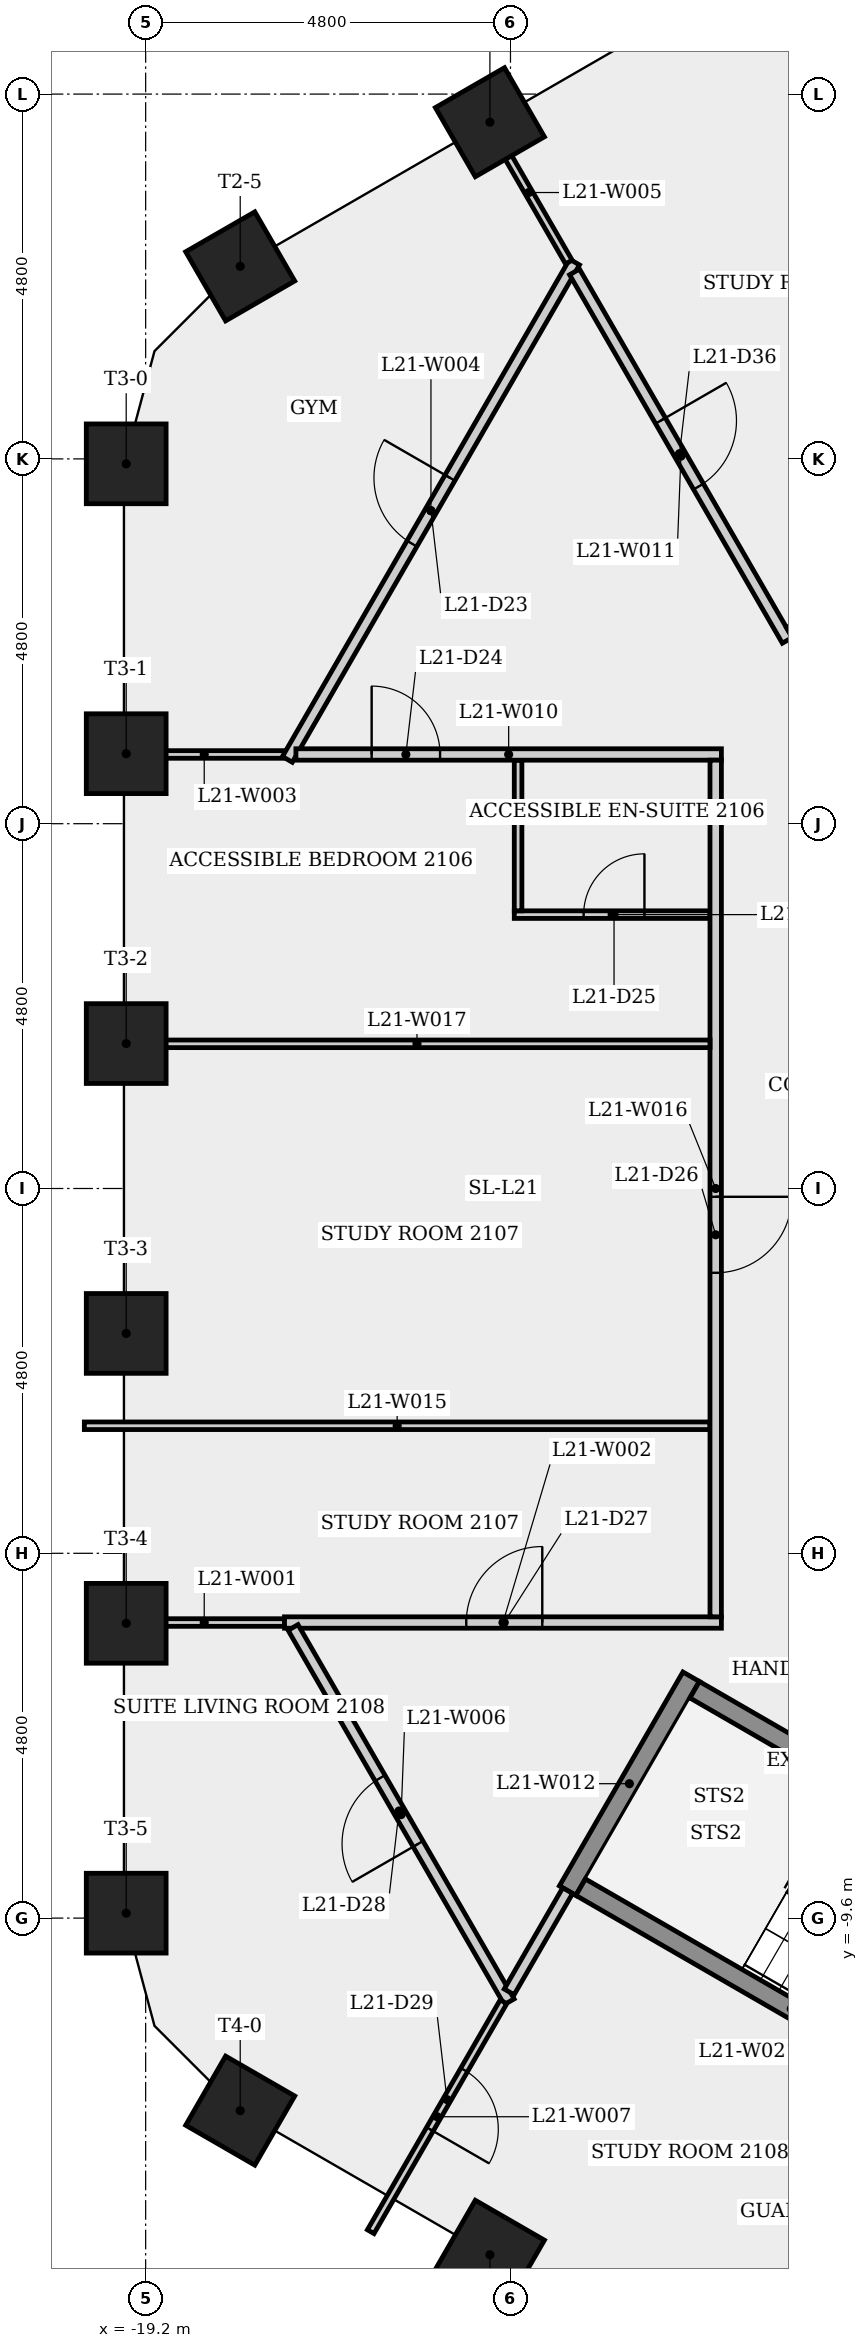
"""IFC4 building model, lengths in metres.
Left out: names, types, materials, properties, quantities, classifications, styles, units other than length and angle.
Written with IfcOpenShell. Run it as: python <this file> out.ifc"""

import sys

from ifc_helpers import new_model, si_unit, direction, frame, frame_2d, origin, origin_2d, place, context, subcontext, project, spatial, rectangle, extrude, element, fill, save


model = new_model("IFC4")
c1 = context("Model", 3, precision=1e-05, world=origin(), true_north=direction((0.0, 1.0)))
c2 = subcontext(c1, "Body", "Model", "MODEL_VIEW")
j1 = project(units=[si_unit("LENGTHUNIT", "METRE"), si_unit("PLANEANGLEUNIT", "RADIAN")], contexts=[c1])
p1 = place(None, origin())
s1 = spatial("IfcSite", under=j1, at=p1, CompositionType="ELEMENT")
p2 = place(p1, origin())
s2 = spatial("IfcBuilding", under=s1, at=p2, CompositionType="ELEMENT")
p3 = place(p2, frame((0.0, 0.0, 83.1)))
s3 = spatial("IfcBuildingStorey", under=s2, at=p3, CompositionType="ELEMENT", Elevation=83.1)
for number, where, z_axis, x_axis in (
    (1, (-14.671, 14.03, 0.0), (0.0, 0.0, 1.0), (-0.5, 0.866, 0.0)),
    (2, (-17.956, 12.133, 0.0), (0.0, 0.0, 1.0), (-0.5, 0.866, 0.0)),
    (3, (-19.456, 9.535, 0.0), (0.0, 0.0, 1.0), (-1.0, 0.0, 0.0)),
    (4, (-19.456, 5.721, 0.0), (0.0, 0.0, 1.0), (-1.0, 0.0, 0.0)),
    (5, (-19.456, 1.907, 0.0), (0.0, 0.0, 1.0), (-1.0, 0.0, 0.0)),
    (6, (-19.456, -1.907, 0.0), (0.0, 0.0, 1.0), (-1.0, 0.0, 0.0)),
    (7, (-19.456, -5.721, 0.0), (0.0, 0.0, 1.0), (-1.0, 0.0, 0.0)),
    (8, (-19.456, -9.535, 0.0), (0.0, 0.0, 1.0), (-1.0, 0.0, 0.0)),
    (9, (-17.956, -12.133, 0.0), (0.0, 0.0, 1.0), (-0.5, -0.866, 0.0)),
    (10, (-14.671, -14.03, 0.0), (0.0, 0.0, 1.0), (-0.5, -0.866, 0.0)),
):
    element("IfcColumn", number, at=place(p3, frame(where, z_axis=z_axis, x_axis=x_axis)), inside=s3, PredefinedType="COLUMN", context=c2, shape_type="SweptSolid", body=[
        extrude(rectangle(XDim=1.05, YDim=1.05, at=origin_2d()), origin(), (0.0, 0.0, 1.0), 3.4),
    ])
p4 = place(p3, frame((-17.373, -5.711, 0.0), z_axis=(0.0, 0.0, 1.0), x_axis=(-1.0, 0.0, 0.0)))
e11 = element("IfcWall", 11, at=p4, inside=s3, PredefinedType="PARTITIONING", context=c2, shape_type="SweptSolid", body=[
    extrude(rectangle(XDim=2.113, YDim=0.1, at=frame_2d((1.056, 0.0))), origin(), (0.0, 0.0, 1.0), 3.05),
])
p5 = place(p3, frame((-17.373, -5.711, 0.0), z_axis=(0.0, 0.0, 1.0), x_axis=(1.0, 0.0, 0.0)))
e12 = element("IfcWall", 12, at=p5, inside=s3, PredefinedType="PARTITIONING", context=c2, shape_type="SweptSolid", body=[
    extrude(rectangle(XDim=5.748, YDim=0.15, at=frame_2d((2.874, 0.0))), origin(), (0.0, 0.0, 1.0), 3.05),
])
p6 = place(p5, frame((2.391, 0.0, 0.0)))
e13 = element("IfcOpeningElement", 13, at=p6, cuts=e12, PredefinedType="OPENING", context=c2, shape_type="SweptSolid", body=[
    extrude(rectangle(XDim=1.0, YDim=2.1, at=frame_2d((0.5, 1.05))), frame((0.0, 0.085, 0.0), z_axis=(0.0, -1.0, 0.0), x_axis=(1.0, 0.0, 0.0)), (0.0, 0.0, 1.0), 0.17),
])
p7 = place(p3, frame((-17.373, 5.711, 0.0), z_axis=(0.0, 0.0, 1.0), x_axis=(-1.0, 0.0, 0.0)))
e14 = element("IfcWall", 14, at=p7, inside=s3, PredefinedType="PARTITIONING", context=c2, shape_type="SweptSolid", body=[
    extrude(rectangle(XDim=2.113, YDim=0.1, at=frame_2d((1.056, 0.0))), origin(), (0.0, 0.0, 1.0), 3.05),
])
p8 = place(p3, frame((-17.335, 5.646, 0.0), z_axis=(0.0, 0.0, 1.0), x_axis=(0.499989064333, 0.866031717402, 0.0)))
e15 = element("IfcWall", 15, at=p8, inside=s3, PredefinedType="PARTITIONING", context=c2, shape_type="SweptSolid", body=[
    extrude(rectangle(XDim=7.557, YDim=0.15, at=frame_2d((3.778, 0.0))), origin(), (0.0, 0.0, 1.0), 3.05),
])
p9 = place(p8, frame((3.278, 0.0, 0.0)))
e16 = element("IfcOpeningElement", 16, at=p9, cuts=e15, PredefinedType="OPENING", context=c2, shape_type="SweptSolid", body=[
    extrude(rectangle(XDim=1.0, YDim=2.1, at=frame_2d((0.5, 1.05))), frame((0.0, 0.085, 0.0), z_axis=(0.0, -1.0, 0.0), x_axis=(1.0, 0.0, 0.0)), (0.0, 0.0, 1.0), 0.17),
])
p10 = place(p3, frame((-14.688, 14.02, 0.0), z_axis=(0.0, 0.0, 1.0), x_axis=(0.500079259916, -0.865979638214, 0.0)))
e17 = element("IfcWall", 17, at=p10, inside=s3, PredefinedType="PARTITIONING", context=c2, shape_type="SweptSolid", body=[
    extrude(rectangle(XDim=2.113, YDim=0.1, at=frame_2d((1.056, 0.0))), origin(), (0.0, 0.0, 1.0), 3.05),
])
p11 = place(p3, frame((-14.417, -10.701, 0.0), z_axis=(0.0, 0.0, 1.0), x_axis=(-0.499985050258, 0.86603403485, 0.0)))
e18 = element("IfcWall", 18, at=p11, inside=s3, PredefinedType="PARTITIONING", context=c2, shape_type="SweptSolid", body=[
    extrude(rectangle(XDim=5.687, YDim=0.15, at=frame_2d((2.844, 0.0))), origin(), (0.0, 0.0, 1.0), 3.05),
])
p12 = place(p11, frame((2.398, 0.0, 0.0)))
e19 = element("IfcOpeningElement", 19, at=p12, cuts=e18, PredefinedType="OPENING", context=c2, shape_type="SweptSolid", body=[
    extrude(rectangle(XDim=1.0, YDim=2.1, at=frame_2d((0.5, 1.05))), frame((0.0, 0.085, 0.0), z_axis=(0.0, -1.0, 0.0), x_axis=(1.0, 0.0, 0.0)), (0.0, 0.0, 1.0), 0.17),
])
p13 = place(p3, frame((-14.492, -10.701, 0.0), z_axis=(0.0, 0.0, 1.0), x_axis=(-0.500024920542, -0.866011015424, 0.0)))
e20 = element("IfcWall", 20, at=p13, inside=s3, PredefinedType="PARTITIONING", context=c2, shape_type="SweptSolid", body=[
    extrude(rectangle(XDim=3.493, YDim=0.1, at=frame_2d((1.747, 0.0))), origin(), (0.0, 0.0, 1.0), 3.05),
])
p14 = place(p13, frame((1.036, 0.0, 0.0)))
e21 = element("IfcOpeningElement", 21, at=p14, cuts=e20, PredefinedType="OPENING", context=c2, shape_type="SweptSolid", body=[
    extrude(rectangle(XDim=0.9, YDim=2.1, at=frame_2d((0.45, 1.05))), frame((0.0, 0.06, 0.0), z_axis=(0.0, -1.0, 0.0), x_axis=(1.0, 0.0, 0.0)), (0.0, 0.0, 1.0), 0.12),
])
p15 = place(p3, frame((-14.35, 3.604, 0.0), z_axis=(0.0, 0.0, 1.0), x_axis=(1.0, 0.0, 0.0)))
e22 = element("IfcWall", 22, at=p15, inside=s3, PredefinedType="PARTITIONING", context=c2, shape_type="SweptSolid", body=[
    extrude(rectangle(XDim=2.575, YDim=0.1, at=frame_2d((1.288, 0.0))), origin(), (0.0, 0.0, 1.0), 3.05),
])
p16 = place(p15, frame((0.913, 0.0, 0.0)))
e23 = element("IfcOpeningElement", 23, at=p16, cuts=e22, PredefinedType="OPENING", context=c2, shape_type="SweptSolid", body=[
    extrude(rectangle(XDim=0.8, YDim=2.1, at=frame_2d((0.4, 1.05))), frame((0.0, 0.06, 0.0), z_axis=(0.0, -1.0, 0.0), x_axis=(1.0, 0.0, 0.0)), (0.0, 0.0, 1.0), 0.12),
])
p17 = place(p3, frame((-14.3, 5.636, 0.0), z_axis=(0.0, 0.0, 1.0), x_axis=(0.0, -1.0, 0.0)))
e24 = element("IfcWall", 24, at=p17, inside=s3, PredefinedType="PARTITIONING", context=c2, shape_type="SweptSolid", body=[
    extrude(rectangle(XDim=1.982, YDim=0.1, at=frame_2d((0.991, 0.0))), origin(), (0.0, 0.0, 1.0), 3.05),
])
p18 = place(p3, frame((-17.223, 5.711, 0.0), z_axis=(0.0, 0.0, 1.0), x_axis=(1.0, 0.0, 0.0)))
e25 = element("IfcWall", 25, at=p18, inside=s3, PredefinedType="PARTITIONING", context=c2, shape_type="SweptSolid", body=[
    extrude(rectangle(XDim=5.598, YDim=0.15, at=frame_2d((2.799, 0.0))), origin(), (0.0, 0.0, 1.0), 3.05),
])
p19 = place(p18, frame((0.997, 0.0, 0.0)))
e26 = element("IfcOpeningElement", 26, at=p19, cuts=e25, PredefinedType="OPENING", context=c2, shape_type="SweptSolid", body=[
    extrude(rectangle(XDim=0.9, YDim=2.1, at=frame_2d((0.45, 1.05))), frame((0.0, 0.085, 0.0), z_axis=(0.0, -1.0, 0.0), x_axis=(1.0, 0.0, 0.0)), (0.0, 0.0, 1.0), 0.17),
])
p20 = place(p3, frame((-13.557, 12.06, 0.0), z_axis=(0.0, 0.0, 1.0), x_axis=(0.499966582715, -0.866044696403, 0.0)))
e27 = element("IfcWall", 27, at=p20, inside=s3, PredefinedType="PARTITIONING", context=c2, shape_type="SweptSolid", body=[
    extrude(rectangle(XDim=5.598, YDim=0.15, at=frame_2d((2.799, 0.0))), origin(), (0.0, 0.0, 1.0), 3.05),
])
p21 = place(p20, frame((2.261, 0.0, 0.0)))
e28 = element("IfcOpeningElement", 28, at=p21, cuts=e27, PredefinedType="OPENING", context=c2, shape_type="SweptSolid", body=[
    extrude(rectangle(XDim=1.0, YDim=2.1, at=frame_2d((0.5, 1.05))), frame((0.0, 0.085, 0.0), z_axis=(0.0, -1.0, 0.0), x_axis=(1.0, 0.0, 0.0)), (0.0, 0.0, 1.0), 0.17),
])
p22 = place(p3, frame((-13.648, -9.239, 0.0), z_axis=(0.0, 0.0, 1.0), x_axis=(0.500017246033, 0.866015446554, 0.0)))
e29 = element("IfcWall", 29, at=p22, inside=s3, PredefinedType="SHEAR", context=c2, shape_type="SweptSolid", body=[
    extrude(rectangle(XDim=3.25, YDim=0.25, at=frame_2d((1.625, 0.0))), origin(), (0.0, 0.0, 1.0), 3.05),
])
p23 = place(p3, frame((-13.648, -9.239, 0.0), z_axis=(0.0, 0.0, 1.0), x_axis=(-0.500116286968, -0.865958255061, 0.0)))
e30 = element("IfcWall", 30, at=p23, inside=s3, PredefinedType="PARTITIONING", context=c2, shape_type="SweptSolid", body=[
    extrude(rectangle(XDim=1.538, YDim=0.15, at=frame_2d((0.769, 0.0))), origin(), (0.0, 0.0, 1.0), 3.05),
])
p24 = place(p3, frame((-11.977, -6.595, 0.0), z_axis=(0.0, 0.0, 1.0), x_axis=(0.866025499775, -0.499999833739, 0.0)))
e31 = element("IfcWall", 31, at=p24, inside=s3, PredefinedType="SHEAR", context=c2, shape_type="SweptSolid", body=[
    extrude(rectangle(XDim=6.4, YDim=0.25, at=frame_2d((3.2, 0.0))), origin(), (0.0, 0.0, 1.0), 3.05),
])
p25 = place(p24, frame((5.025, 0.0, 0.0)))
e32 = element("IfcOpeningElement", 32, at=p25, cuts=e31, PredefinedType="OPENING", context=c2, shape_type="SweptSolid", body=[
    extrude(rectangle(XDim=1.0, YDim=2.1, at=frame_2d((0.5, 1.05))), frame((0.0, 0.135, 0.0), z_axis=(0.0, -1.0, 0.0), x_axis=(1.0, 0.0, 0.0)), (0.0, 0.0, 1.0), 0.27),
])
p26 = place(p3, frame((-11.775, -3.122, 0.0), z_axis=(0.0, 0.0, 1.0), x_axis=(-1.0, 0.0, 0.0)))
e33 = element("IfcWall", 33, at=p26, inside=s3, PredefinedType="PARTITIONING", context=c2, shape_type="SweptSolid", body=[
    extrude(rectangle(XDim=8.232, YDim=0.1, at=frame_2d((4.116, 0.0))), origin(), (0.0, 0.0, 1.0), 3.05),
])
p27 = place(p3, frame((-11.7, 5.636, 0.0), z_axis=(0.0, 0.0, 1.0), x_axis=(0.0, -1.0, 0.0)))
e34 = element("IfcWall", 34, at=p27, inside=s3, PredefinedType="PARTITIONING", context=c2, shape_type="SweptSolid", body=[
    extrude(rectangle(XDim=11.271, YDim=0.15, at=frame_2d((5.636, 0.0))), origin(), (0.0, 0.0, 1.0), 3.05),
])
p28 = place(p27, frame((5.745, 0.0, 0.0)))
e35 = element("IfcOpeningElement", 35, at=p28, cuts=e34, PredefinedType="OPENING", context=c2, shape_type="SweptSolid", body=[
    extrude(rectangle(XDim=1.0, YDim=2.1, at=frame_2d((0.5, 1.05))), frame((0.0, 0.085, 0.0), z_axis=(0.0, -1.0, 0.0), x_axis=(1.0, 0.0, 0.0)), (0.0, 0.0, 1.0), 0.17),
])
p29 = place(p3, frame((-11.775, 1.904, 0.0), z_axis=(0.0, 0.0, 1.0), x_axis=(-1.0, 0.0, 0.0)))
e36 = element("IfcWall", 36, at=p29, inside=s3, PredefinedType="PARTITIONING", context=c2, shape_type="SweptSolid", body=[
    extrude(rectangle(XDim=7.711, YDim=0.1, at=frame_2d((3.855, 0.0))), origin(), (0.0, 0.0, 1.0), 3.05),
])
p30 = place(p3, frame((-10.731, 7.315, 0.0), z_axis=(0.0, 0.0, 1.0), x_axis=(0.866024779313, 0.500001081615, 0.0)))
e37 = element("IfcWall", 37, at=p30, inside=s3, PredefinedType="PARTITIONING", context=c2, shape_type="SweptSolid", body=[
    extrude(rectangle(XDim=10.872, YDim=0.15, at=frame_2d((5.436, 0.0))), origin(), (0.0, 0.0, 1.0), 3.05),
])
p31 = place(p30, frame((5.745, 0.0, 0.0)))
e38 = element("IfcOpeningElement", 38, at=p31, cuts=e37, PredefinedType="OPENING", context=c2, shape_type="SweptSolid", body=[
    extrude(rectangle(XDim=1.0, YDim=2.1, at=frame_2d((0.5, 1.05))), frame((0.0, 0.085, 0.0), z_axis=(0.0, -1.0, 0.0), x_axis=(1.0, 0.0, 0.0)), (0.0, 0.0, 1.0), 0.17),
])
p32 = place(p3, frame((-7.935, -12.393, 0.0), z_axis=(0.0, 0.0, 1.0), x_axis=(-0.866025499775, 0.499999833739, 0.0)))
e39 = element("IfcWall", 39, at=p32, inside=s3, PredefinedType="SHEAR", context=c2, shape_type="SweptSolid", body=[
    extrude(rectangle(XDim=6.4, YDim=0.25, at=frame_2d((3.2, 0.0))), origin(), (0.0, 0.0, 1.0), 3.05),
])
p33 = place(p9, origin())
e40 = element("IfcDoor", 40, at=p33, inside=s3, OperationType="SINGLE_SWING_RIGHT", PredefinedType="DOOR", context=c2, shape_type="SweptSolid", body=[
    extrude(rectangle(XDim=1.0, YDim=2.1, at=frame_2d((0.5, 1.05))), frame((0.0, 0.025, 0.0), z_axis=(0.0, -1.0, 0.0), x_axis=(1.0, 0.0, 0.0)), (0.0, 0.0, 1.0), 0.05),
])
fill(e16, e40)
p34 = place(p19, origin())
e41 = element("IfcDoor", 41, at=p34, inside=s3, OperationType="SINGLE_SWING_LEFT", PredefinedType="DOOR", context=c2, shape_type="SweptSolid", body=[
    extrude(rectangle(XDim=0.9, YDim=2.1, at=frame_2d((0.45, 1.05))), frame((0.0, 0.025, 0.0), z_axis=(0.0, -1.0, 0.0), x_axis=(1.0, 0.0, 0.0)), (0.0, 0.0, 1.0), 0.05),
])
fill(e26, e41)
p35 = place(p16, origin())
e42 = element("IfcDoor", 42, at=p35, inside=s3, OperationType="SINGLE_SWING_RIGHT", PredefinedType="DOOR", context=c2, shape_type="SweptSolid", body=[
    extrude(rectangle(XDim=0.8, YDim=2.1, at=frame_2d((0.4, 1.05))), frame((0.0, 0.025, 0.0), z_axis=(0.0, -1.0, 0.0), x_axis=(1.0, 0.0, 0.0)), (0.0, 0.0, 1.0), 0.05),
])
fill(e23, e42)
p36 = place(p28, origin())
e43 = element("IfcDoor", 43, at=p36, inside=s3, OperationType="SINGLE_SWING_LEFT", PredefinedType="DOOR", context=c2, shape_type="SweptSolid", body=[
    extrude(rectangle(XDim=1.0, YDim=2.1, at=frame_2d((0.5, 1.05))), frame((0.0, 0.025, 0.0), z_axis=(0.0, -1.0, 0.0), x_axis=(1.0, 0.0, 0.0)), (0.0, 0.0, 1.0), 0.05),
])
fill(e35, e43)
p37 = place(p6, origin())
e44 = element("IfcDoor", 44, at=p37, inside=s3, OperationType="SINGLE_SWING_RIGHT", PredefinedType="DOOR", context=c2, shape_type="SweptSolid", body=[
    extrude(rectangle(XDim=1.0, YDim=2.1, at=frame_2d((0.5, 1.05))), frame((0.0, 0.025, 0.0), z_axis=(0.0, -1.0, 0.0), x_axis=(1.0, 0.0, 0.0)), (0.0, 0.0, 1.0), 0.05),
])
fill(e13, e44)
p38 = place(p12, origin())
e45 = element("IfcDoor", 45, at=p38, inside=s3, OperationType="SINGLE_SWING_LEFT", PredefinedType="DOOR", context=c2, shape_type="SweptSolid", body=[
    extrude(rectangle(XDim=1.0, YDim=2.1, at=frame_2d((0.5, 1.05))), frame((0.0, 0.025, 0.0), z_axis=(0.0, -1.0, 0.0), x_axis=(1.0, 0.0, 0.0)), (0.0, 0.0, 1.0), 0.05),
])
fill(e19, e45)
p39 = place(p14, origin())
e46 = element("IfcDoor", 46, at=p39, inside=s3, OperationType="SINGLE_SWING_RIGHT", PredefinedType="DOOR", context=c2, shape_type="SweptSolid", body=[
    extrude(rectangle(XDim=0.9, YDim=2.1, at=frame_2d((0.45, 1.05))), frame((0.0, 0.025, 0.0), z_axis=(0.0, -1.0, 0.0), x_axis=(1.0, 0.0, 0.0)), (0.0, 0.0, 1.0), 0.05),
])
fill(e21, e46)
p40 = place(p21, origin())
e47 = element("IfcDoor", 47, at=p40, inside=s3, OperationType="SINGLE_SWING_LEFT", PredefinedType="DOOR", context=c2, shape_type="SweptSolid", body=[
    extrude(rectangle(XDim=1.0, YDim=2.1, at=frame_2d((0.5, 1.05))), frame((0.0, 0.025, 0.0), z_axis=(0.0, -1.0, 0.0), x_axis=(1.0, 0.0, 0.0)), (0.0, 0.0, 1.0), 0.05),
])
fill(e28, e47)
save(model, sys.argv[1])
